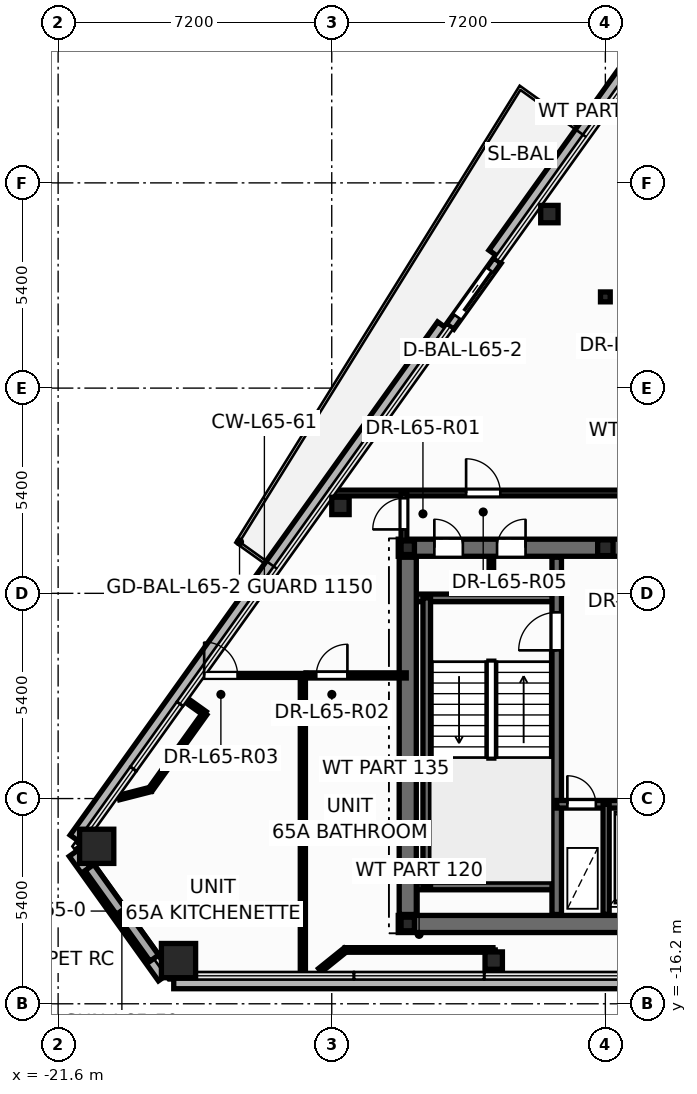
"""IFC4 building model, lengths in metres.
Left out: names, types, materials, properties, quantities, classifications, styles, units other than length and angle.
Written with IfcOpenShell. Run it as: python <this file> out.ifc"""

import sys

from ifc_helpers import new_model, si_unit, direction, frame, frame_2d, origin, origin_2d, place, context, subcontext, project, spatial, rectangle, hollow_rectangle, hollow_circle, i_section, extrude, element, fill, save


model = new_model("IFC4")
c1 = context("Model", 3, precision=1e-05, world=origin(), true_north=direction((0.0, 1.0)))
c2 = subcontext(c1, "Body", "Model", "MODEL_VIEW")
j1 = project(units=[si_unit("LENGTHUNIT", "METRE"), si_unit("PLANEANGLEUNIT", "RADIAN")], contexts=[c1])
p1 = place(None, origin())
s1 = spatial("IfcSite", under=j1, at=p1, CompositionType="ELEMENT")
p2 = place(p1, origin())
s2 = spatial("IfcBuilding", under=s1, at=p2, CompositionType="ELEMENT")
p3 = place(p2, frame((0.0, 0.0, 249.0)))
s3 = spatial("IfcBuildingStorey", under=s2, at=p3, CompositionType="ELEMENT", Elevation=249.0)
for number, where, z_axis, x_axis in (
    (1, (-20.585, -12.057, 0.0), (0.0, 0.0, 1.0), (1.0, 0.0, 0.0)),
    (2, (-18.432, -15.063, 0.0), (0.0, 0.0, 1.0), (1.0, 0.0, 0.0)),
):
    element("IfcColumn", number, at=place(p3, frame(where, z_axis=z_axis, x_axis=x_axis)), inside=s3, PredefinedType="COLUMN", context=c2, shape_type="SweptSolid", body=[
        extrude(hollow_rectangle(XDim=0.9, YDim=0.9, WallThickness=0.04, at=origin_2d()), origin(), (0.0, 0.0, 1.0), 3.6),
    ])
for number, where, z_axis, x_axis in (
    (3, (-10.138, -15.063, 0.0), (0.0, 0.0, 1.0), (1.0, 0.0, 0.0)),
    (4, (-8.673, 4.579, 0.0), (0.0, 0.0, 1.0), (1.0, 0.0, 0.0)),
    (5, (-14.171, -3.099, 0.0), (0.0, 0.0, 1.0), (1.0, 0.0, 0.0)),
):
    element("IfcColumn", number, at=place(p3, frame(where, z_axis=z_axis, x_axis=x_axis)), inside=s3, PredefinedType="COLUMN", context=c2, shape_type="SweptSolid", body=[
        extrude(hollow_circle(Radius=0.229, WallThickness=0.016, at=origin_2d()), origin(), (0.0, 0.0, 1.0), 3.6),
    ])
for number, where, z_axis, x_axis in (
    (6, (-12.4, -14.1, 0.0), (0.0, 0.0, 1.0), (1.0, 0.0, 0.0)),
    (7, (-12.4, -4.2, 0.0), (0.0, 0.0, 1.0), (1.0, 0.0, 0.0)),
):
    element("IfcColumn", number, at=place(p3, frame(where, z_axis=z_axis, x_axis=x_axis)), inside=s3, PredefinedType="COLUMN", context=c2, shape_type="SweptSolid", body=[
        extrude(i_section(OverallWidth=0.352, OverallDepth=0.359, WebThickness=0.018, FlangeThickness=0.026, at=origin_2d()), origin(), (0.0, 0.0, 1.0), 3.6),
    ])
p4 = place(p3, frame((-7.2, -4.2, 0.0), z_axis=(0.0, 0.0, 1.0), x_axis=(1.0, 0.0, 0.0)))
e8 = element("IfcColumn", 8, at=p4, inside=s3, PredefinedType="PILASTER", context=c2, shape_type="SweptSolid", body=[
    extrude(i_section(OverallWidth=0.405, OverallDepth=0.414, WebThickness=0.022, FlangeThickness=0.032, at=origin_2d()), origin(), (0.0, 0.0, 1.0), 3.6),
])
p5 = place(p3, frame((-7.2, 2.4, 0.0), z_axis=(0.0, 0.0, 1.0), x_axis=(1.0, 0.0, 0.0)))
e9 = element("IfcColumn", 9, at=p5, inside=s3, PredefinedType="COLUMN", context=c2, shape_type="SweptSolid", body=[
    extrude(i_section(OverallWidth=0.256, OverallDepth=0.26, WebThickness=0.01, FlangeThickness=0.017, at=origin_2d()), origin(), (0.0, 0.0, 1.0), 3.6),
])
p6 = place(p3, frame((-21.161, -12.215, -0.2), z_axis=(0.0, 0.0, 1.0), x_axis=(0.582223401732, -0.813028849719, 0.0)))
e10 = element("IfcWall", 10, at=p6, inside=s3, PredefinedType="PARAPET", context=c2, shape_type="SweptSolid", body=[
    extrude(rectangle(XDim=4.03, YDim=0.36, at=frame_2d((2.015, 0.0))), origin(), (0.0, 0.0, 1.0), 0.38),
])
p7 = place(p3, frame((-18.558, -15.623, -0.2), z_axis=(0.0, 0.0, 1.0), x_axis=(1.0, 0.0, 0.0)))
e11 = element("IfcWall", 11, at=p7, inside=s3, PredefinedType="PARAPET", context=c2, shape_type="SweptSolid", body=[
    extrude(rectangle(XDim=37.115, YDim=0.36, at=frame_2d((18.558, 0.0))), origin(), (0.0, 0.0, 1.0), 0.38),
])
p8 = place(p3, frame((-2.664, 13.932, -0.2), z_axis=(0.0, 0.0, 1.0), x_axis=(-0.582199295351, -0.813046112156, 0.0)))
e12 = element("IfcWall", 12, at=p8, inside=s3, PredefinedType="PARAPET", context=c2, shape_type="SweptSolid", body=[
    extrude(rectangle(XDim=12.802, YDim=0.36, at=frame_2d((6.401, 0.0))), origin(), (0.0, 0.0, 1.0), 0.38),
])
p9 = place(p3, frame((-11.468, 1.637, -0.2), z_axis=(0.0, 0.0, 1.0), x_axis=(-0.582200027891, -0.813045587605, 0.0)))
e13 = element("IfcWall", 13, at=p9, inside=s3, PredefinedType="PARAPET", context=c2, shape_type="SweptSolid", body=[
    extrude(rectangle(XDim=16.608, YDim=0.36, at=frame_2d((8.304, 0.0))), origin(), (0.0, 0.0, 1.0), 0.38),
])
p10 = place(p3, frame((-10.039, 3.357, -0.015), z_axis=(0.0, 0.0, 1.0), x_axis=(-0.58216589686, -0.813070026832, 0.0)))
e14 = element("IfcWall", 14, at=p10, inside=s3, PredefinedType="STANDARD", context=c2, shape_type="SweptSolid", body=[
    extrude(rectangle(XDim=2.14, YDim=0.24, at=frame_2d((1.07, 0.0))), origin(), (0.0, 0.0, 1.0), 2.878),
])
p11 = place(p10, frame((0.32, 0.0, 0.015)))
e15 = element("IfcOpeningElement", 15, at=p11, cuts=e14, PredefinedType="OPENING", context=c2, shape_type="SweptSolid", body=[
    extrude(rectangle(XDim=1.506, YDim=2.204, at=frame_2d((0.75, 1.102))), frame((0.0, 0.13, 0.0), z_axis=(0.0, -1.0, 0.0), x_axis=(1.0, 0.0, 0.0)), (0.0, 0.0, 1.0), 0.26),
])
p12 = place(p3, frame((-10.2, -5.52, 0.0), z_axis=(0.0, 0.0, 1.0), x_axis=(0.0, 1.0, 0.0)))
e16 = element("IfcWall", 16, at=p12, inside=s3, PredefinedType="PARTITIONING", context=c2, shape_type="SweptSolid", body=[
    extrude(rectangle(XDim=1.12, YDim=0.12, at=frame_2d((0.56, 0.0))), origin(), (0.0, 0.0, 1.0), 3.345),
])
p13 = place(p3, frame((-12.65, -14.1, 0.0), z_axis=(0.0, 0.0, 1.0), x_axis=(1.0, 0.0, 0.0)))
e17 = element("IfcWall", 17, at=p13, inside=s3, PredefinedType="SHEAR", context=c2, shape_type="SweptSolid", body=[
    extrude(rectangle(XDim=25.3, YDim=0.45, at=frame_2d((12.65, 0.0))), origin(), (0.0, 0.0, 1.0), 3.6),
])
p14 = place(p3, frame((-12.65, -4.2, 0.0), z_axis=(0.0, 0.0, 1.0), x_axis=(1.0, 0.0, 0.0)))
e18 = element("IfcWall", 18, at=p14, inside=s3, PredefinedType="SHEAR", context=c2, shape_type="SweptSolid", body=[
    extrude(rectangle(XDim=25.3, YDim=0.45, at=frame_2d((12.65, 0.0))), origin(), (0.0, 0.0, 1.0), 3.6),
])
p15 = place(p14, frame((0.95, 0.0, 0.0)))
e19 = element("IfcOpeningElement", 19, at=p15, cuts=e18, PredefinedType="OPENING", context=c2, shape_type="SweptSolid", body=[
    extrude(rectangle(XDim=0.756, YDim=2.054, at=frame_2d((0.375, 1.027))), frame((0.0, 0.235, 0.0), z_axis=(0.0, -1.0, 0.0), x_axis=(1.0, 0.0, 0.0)), (0.0, 0.0, 1.0), 0.47),
])
p16 = place(p14, frame((2.6, 0.0, 0.0)))
e20 = element("IfcOpeningElement", 20, at=p16, cuts=e18, PredefinedType="OPENING", context=c2, shape_type="SweptSolid", body=[
    extrude(rectangle(XDim=0.756, YDim=2.054, at=frame_2d((0.375, 1.027))), frame((0.0, 0.235, 0.0), z_axis=(0.0, -1.0, 0.0), x_axis=(1.0, 0.0, 0.0)), (0.0, 0.0, 1.0), 0.47),
])
p17 = place(p14, frame((21.85, 0.0, 0.0)))
e21 = element("IfcOpeningElement", 21, at=p17, cuts=e18, PredefinedType="OPENING", context=c2, shape_type="SweptSolid", body=[
    extrude(rectangle(XDim=0.756, YDim=2.054, at=frame_2d((0.375, 1.027))), frame((0.0, 0.235, 0.0), z_axis=(0.0, -1.0, 0.0), x_axis=(1.0, 0.0, 0.0)), (0.0, 0.0, 1.0), 0.47),
])
p18 = place(p14, frame((23.5, 0.0, 0.0)))
e22 = element("IfcOpeningElement", 22, at=p18, cuts=e18, PredefinedType="OPENING", context=c2, shape_type="SweptSolid", body=[
    extrude(rectangle(XDim=0.756, YDim=2.054, at=frame_2d((0.375, 1.027))), frame((0.0, 0.235, 0.0), z_axis=(0.0, -1.0, 0.0), x_axis=(1.0, 0.0, 0.0)), (0.0, 0.0, 1.0), 0.47),
])
p19 = place(p14, frame((5.85, 0.0, 0.0)))
e23 = element("IfcOpeningElement", 23, at=p19, cuts=e18, PredefinedType="OPENING", context=c2, shape_type="SweptSolid", body=[
    extrude(rectangle(XDim=1.006, YDim=2.104, at=frame_2d((0.5, 1.052))), frame((0.0, 0.235, 0.0), z_axis=(0.0, -1.0, 0.0), x_axis=(1.0, 0.0, 0.0)), (0.0, 0.0, 1.0), 0.47),
])
p20 = place(p14, frame((10.35, 0.0, 0.0)))
e24 = element("IfcOpeningElement", 24, at=p20, cuts=e18, PredefinedType="OPENING", context=c2, shape_type="SweptSolid", body=[
    extrude(rectangle(XDim=1.406, YDim=2.154, at=frame_2d((0.7, 1.077))), frame((0.0, 0.235, 0.0), z_axis=(0.0, -1.0, 0.0), x_axis=(1.0, 0.0, 0.0)), (0.0, 0.0, 1.0), 0.47),
])
p21 = place(p14, frame((18.45, 0.0, 0.0)))
e25 = element("IfcOpeningElement", 25, at=p21, cuts=e18, PredefinedType="OPENING", context=c2, shape_type="SweptSolid", body=[
    extrude(rectangle(XDim=1.006, YDim=2.104, at=frame_2d((0.5, 1.052))), frame((0.0, 0.235, 0.0), z_axis=(0.0, -1.0, 0.0), x_axis=(1.0, 0.0, 0.0)), (0.0, 0.0, 1.0), 0.47),
])
for number, where, z_axis, x_axis in (
    (26, (-12.35, -5.52, 0.0), (0.0, 0.0, 1.0), (1.0, 0.0, 0.0)),
    (27, (-12.35, -13.1, 0.0), (0.0, 0.0, 1.0), (1.0, 0.0, 0.0)),
):
    element("IfcWall", number, at=place(p3, frame(where, z_axis=z_axis, x_axis=x_axis)), inside=s3, PredefinedType="SOLIDWALL", context=c2, shape_type="SweptSolid", body=[
        extrude(rectangle(XDim=3.87, YDim=0.2, at=frame_2d((1.935, 0.0))), origin(), (0.0, 0.0, 1.0), 3.6),
    ])
p22 = place(p3, frame((-11.9, -13.1, 0.0), z_axis=(0.0, 0.0, 1.0), x_axis=(0.0, 1.0, 0.0)))
e28 = element("IfcWall", 28, at=p22, inside=s3, PredefinedType="SOLIDWALL", context=c2, shape_type="SweptSolid", body=[
    extrude(rectangle(XDim=7.58, YDim=0.2, at=frame_2d((3.79, 0.0))), origin(), (0.0, 0.0, 1.0), 3.6),
])
p23 = place(p3, frame((-8.48, -13.85, 0.0), z_axis=(0.0, 0.0, 1.0), x_axis=(0.0, 1.0, 0.0)))
e29 = element("IfcWall", 29, at=p23, inside=s3, PredefinedType="SHEAR", context=c2, shape_type="SweptSolid", body=[
    extrude(rectangle(XDim=9.4, YDim=0.25, at=frame_2d((4.7, 0.0))), origin(), (0.0, 0.0, 1.0), 3.6),
])
p24 = place(p23, frame((6.95, 0.0, 0.0)))
e30 = element("IfcOpeningElement", 30, at=p24, cuts=e29, PredefinedType="OPENING", context=c2, shape_type="SweptSolid", body=[
    extrude(rectangle(XDim=1.006, YDim=2.104, at=frame_2d((0.5, 1.052))), frame((0.0, 0.135, 0.0), z_axis=(0.0, -1.0, 0.0), x_axis=(1.0, 0.0, 0.0)), (0.0, 0.0, 1.0), 0.27),
])
p25 = place(p3, frame((-8.48, -10.95, 0.0), z_axis=(0.0, 0.0, 1.0), x_axis=(1.0, 0.0, 0.0)))
e31 = element("IfcWall", 31, at=p25, inside=s3, PredefinedType="SOLIDWALL", context=c2, shape_type="SweptSolid", body=[
    extrude(rectangle(XDim=3.36, YDim=0.2, at=frame_2d((1.68, 0.0))), origin(), (0.0, 0.0, 1.0), 3.6),
])
p26 = place(p25, frame((0.28, 0.0, 0.0)))
e32 = element("IfcOpeningElement", 32, at=p26, cuts=e31, PredefinedType="OPENING", context=c2, shape_type="SweptSolid", body=[
    extrude(rectangle(XDim=0.756, YDim=2.054, at=frame_2d((0.375, 1.027))), frame((0.0, 0.11, 0.0), z_axis=(0.0, -1.0, 0.0), x_axis=(1.0, 0.0, 0.0)), (0.0, 0.0, 1.0), 0.22),
])
p27 = place(p25, frame((1.85, 0.0, 0.0)))
e33 = element("IfcOpeningElement", 33, at=p27, cuts=e31, PredefinedType="OPENING", context=c2, shape_type="SweptSolid", body=[
    extrude(rectangle(XDim=1.106, YDim=2.104, at=frame_2d((0.55, 1.052))), frame((0.0, 0.11, 0.0), z_axis=(0.0, -1.0, 0.0), x_axis=(1.0, 0.0, 0.0)), (0.0, 0.0, 1.0), 0.22),
])
p28 = place(p3, frame((-7.18, -13.85, 0.0), z_axis=(0.0, 0.0, 1.0), x_axis=(0.0, 1.0, 0.0)))
e34 = element("IfcWall", 34, at=p28, inside=s3, PredefinedType="PARTITIONING", context=c2, shape_type="SweptSolid", body=[
    extrude(rectangle(XDim=2.9, YDim=0.16, at=frame_2d((1.45, 0.0))), origin(), (0.0, 0.0, 1.0), 2.57),
])
p29 = place(p3, frame((-12.4, -13.85, 0.0), z_axis=(0.0, 0.0, 1.0), x_axis=(0.0, 1.0, 0.0)))
e35 = element("IfcWall", 35, at=p29, inside=s3, PredefinedType="SHEAR", context=c2, shape_type="SweptSolid", body=[
    extrude(rectangle(XDim=9.4, YDim=0.45, at=frame_2d((4.7, 0.0))), origin(), (0.0, 0.0, 1.0), 3.6),
])
p30 = place(p3, frame((-14.42, -2.76, 0.0), z_axis=(0.0, 0.0, 1.0), x_axis=(1.0, 0.0, 0.0)))
e36 = element("IfcWall", 36, at=p30, inside=s3, PredefinedType="PARTITIONING", context=c2, shape_type="SweptSolid", body=[
    extrude(rectangle(XDim=9.88, YDim=0.15, at=frame_2d((4.94, 0.0))), origin(), (0.0, 0.0, 1.0), 2.32),
])
p31 = place(p30, frame((3.555, 0.0, 0.0)))
e37 = element("IfcOpeningElement", 37, at=p31, cuts=e36, PredefinedType="OPENING", context=c2, shape_type="SweptSolid", body=[
    extrude(rectangle(XDim=0.906, YDim=2.104, at=frame_2d((0.45, 1.052))), frame((0.0, 0.085, 0.0), z_axis=(0.0, -1.0, 0.0), x_axis=(1.0, 0.0, 0.0)), (0.0, 0.0, 1.0), 0.17),
])
p32 = place(p3, frame((-15.16, -15.463, 0.0), z_axis=(0.0, 0.0, 1.0), x_axis=(0.0, 1.0, 0.0)))
e38 = element("IfcWall", 38, at=p32, inside=s3, PredefinedType="PARTITIONING", context=c2, shape_type="SweptSolid", body=[
    extrude(rectangle(XDim=7.903, YDim=0.135, at=frame_2d((3.952, 0.0))), origin(), (0.0, 0.0, 1.0), 2.863),
])
p33 = place(p3, frame((-14.044, -14.783, 0.0), z_axis=(0.0, 0.0, 1.0), x_axis=(1.0, 0.0, 0.0)))
e39 = element("IfcWall", 39, at=p33, inside=s3, PredefinedType="PARTITIONING", context=c2, shape_type="SweptSolid", body=[
    extrude(rectangle(XDim=3.886, YDim=0.12, at=frame_2d((1.943, 0.0))), origin(), (0.0, 0.0, 1.0), 2.863),
])
p34 = place(p3, frame((-17.857, -7.56, 0.0), z_axis=(0.0, 0.0, 1.0), x_axis=(1.0, 0.0, 0.0)))
e40 = element("IfcWall", 40, at=p34, inside=s3, PredefinedType="PARTITIONING", context=c2, shape_type="SweptSolid", body=[
    extrude(rectangle(XDim=2.777, YDim=0.105, at=frame_2d((1.389, 0.0))), origin(), (0.0, 0.0, 1.0), 2.32),
])
p35 = place(p34, frame((0.1, 0.0, 0.0)))
e41 = element("IfcOpeningElement", 41, at=p35, cuts=e40, PredefinedType="OPENING", context=c2, shape_type="SweptSolid", body=[
    extrude(rectangle(XDim=0.886, YDim=2.104, at=frame_2d((0.44, 1.052))), frame((0.0, 0.062, 0.0), z_axis=(0.0, -1.0, 0.0), x_axis=(1.0, 0.0, 0.0)), (0.0, 0.0, 1.0), 0.125),
])
p36 = place(p3, frame((-15.078, -7.56, 0.0), z_axis=(0.0, 0.0, 1.0), x_axis=(1.0, 0.0, 0.0)))
e42 = element("IfcWall", 42, at=p36, inside=s3, PredefinedType="PARTITIONING", context=c2, shape_type="SweptSolid", body=[
    extrude(rectangle(XDim=2.638, YDim=0.135, at=frame_2d((1.319, 0.0))), origin(), (0.0, 0.0, 1.0), 2.863),
])
p37 = place(p36, frame((0.271, 0.0, 0.0)))
e43 = element("IfcOpeningElement", 43, at=p37, cuts=e42, PredefinedType="OPENING", context=c2, shape_type="SweptSolid", body=[
    extrude(rectangle(XDim=0.826, YDim=2.104, at=frame_2d((0.41, 1.052))), frame((0.0, 0.078, 0.0), z_axis=(0.0, -1.0, 0.0), x_axis=(1.0, 0.0, 0.0)), (0.0, 0.0, 1.0), 0.155),
])
p38 = place(p3, frame((-17.738, -8.561, 0.0), z_axis=(0.0, 0.0, 1.0), x_axis=(-0.582157358489, -0.81307614032, 0.0)))
e44 = element("IfcWall", 44, at=p38, inside=s3, PredefinedType="PARTITIONING", context=c2, shape_type="SweptSolid", body=[
    extrude(rectangle(XDim=2.461, YDim=0.12, at=frame_2d((1.23, 0.0))), origin(), (0.0, 0.0, 1.0), 2.32),
])
p39 = place(p3, frame((-12.5, -4.24, 0.0), z_axis=(0.0, 0.0, 1.0), x_axis=(0.0, 1.0, 0.0)))
e45 = element("IfcWall", 45, at=p39, inside=s3, PredefinedType="PARTITIONING", context=c2, shape_type="SweptSolid", body=[
    extrude(rectangle(XDim=1.48, YDim=0.15, at=frame_2d((0.74, 0.0))), origin(), (0.0, 0.0, 1.0), 2.32),
])
p40 = place(p39, frame((0.522, 0.0, 0.0)))
e46 = element("IfcOpeningElement", 46, at=p40, cuts=e45, PredefinedType="OPENING", context=c2, shape_type="SweptSolid", body=[
    extrude(rectangle(XDim=0.826, YDim=2.104, at=frame_2d((0.41, 1.052))), frame((0.0, 0.085, 0.0), z_axis=(0.0, -1.0, 0.0), x_axis=(1.0, 0.0, 0.0)), (0.0, 0.0, 1.0), 0.17),
])
p41 = place(p3, frame((-14.708, -15.318, 0.0), z_axis=(0.0, 0.0, 1.0), x_axis=(0.778769450364, 0.62731024476, 0.0)))
e47 = element("IfcWall", 47, at=p41, inside=s3, PredefinedType="PARTITIONING", context=c2, shape_type="SweptSolid", body=[
    extrude(rectangle(XDim=0.853, YDim=0.12, at=frame_2d((0.426, 0.0))), origin(), (0.0, 0.0, 1.0), 2.863),
])
p42 = place(p3, frame((-19.17, -10.562, 0.0), z_axis=(0.0, 0.0, 1.0), x_axis=(-0.968778693612, -0.247927091708, 0.0)))
e48 = element("IfcWall", 48, at=p42, inside=s3, PredefinedType="PARTITIONING", context=c2, shape_type="SweptSolid", body=[
    extrude(rectangle(XDim=0.852, YDim=0.12, at=frame_2d((0.426, 0.0))), origin(), (0.0, 0.0, 1.0), 2.32),
])
p43 = place(p3, frame((-18.282, -8.171, 0.0), z_axis=(0.0, 0.0, 1.0), x_axis=(0.813142011208, -0.582065348229, 0.0)))
e49 = element("IfcWall", 49, at=p43, inside=s3, PredefinedType="PARTITIONING", context=c2, shape_type="SweptSolid", body=[
    extrude(rectangle(XDim=0.67, YDim=0.12, at=frame_2d((0.335, 0.0))), origin(), (0.0, 0.0, 1.0), 2.863),
])
p44 = place(p3, frame((-10.158, -14.783, 0.0), z_axis=(0.0, 0.0, 1.0), x_axis=(0.0, -1.0, 0.0)))
e50 = element("IfcWall", 50, at=p44, inside=s3, PredefinedType="PARTITIONING", context=c2, shape_type="SweptSolid", body=[
    extrude(rectangle(XDim=0.67, YDim=0.12, at=frame_2d((0.335, 0.0))), origin(), (0.0, 0.0, 1.0), 2.863),
])
p45 = place(p11, origin())
e51 = element("IfcDoor", 51, at=p45, inside=s3, OperationType="SLIDING_TO_RIGHT", PredefinedType="DOOR", context=c2, shape_type="SweptSolid", body=[
    extrude(rectangle(XDim=1.5, YDim=2.2, at=frame_2d((0.75, 1.1))), frame((0.0, 0.025, 0.0), z_axis=(0.0, -1.0, 0.0), x_axis=(1.0, 0.0, 0.0)), (0.0, 0.0, 1.0), 0.05),
])
fill(e15, e51)
p46 = place(p24, origin())
e52 = element("IfcDoor", 52, at=p46, inside=s3, OperationType="SINGLE_SWING_LEFT", PredefinedType="DOOR", context=c2, shape_type="SweptSolid", body=[
    extrude(rectangle(XDim=1.0, YDim=2.1, at=frame_2d((0.5, 1.05))), frame((0.0, 0.025, 0.0), z_axis=(0.0, -1.0, 0.0), x_axis=(1.0, 0.0, 0.0)), (0.0, 0.0, 1.0), 0.05),
])
fill(e30, e52)
p47 = place(p26, origin())
e53 = element("IfcDoor", 53, at=p47, inside=s3, OperationType="SINGLE_SWING_LEFT", PredefinedType="DOOR", context=c2, shape_type="SweptSolid", body=[
    extrude(rectangle(XDim=0.75, YDim=2.05, at=frame_2d((0.375, 1.025))), frame((0.0, 0.025, 0.0), z_axis=(0.0, -1.0, 0.0), x_axis=(1.0, 0.0, 0.0)), (0.0, 0.0, 1.0), 0.05),
])
fill(e32, e53)
p48 = place(p15, origin())
e54 = element("IfcDoor", 54, at=p48, inside=s3, OperationType="SINGLE_SWING_LEFT", PredefinedType="DOOR", context=c2, shape_type="SweptSolid", body=[
    extrude(rectangle(XDim=0.75, YDim=2.05, at=frame_2d((0.375, 1.025))), frame((0.0, 0.025, 0.0), z_axis=(0.0, -1.0, 0.0), x_axis=(1.0, 0.0, 0.0)), (0.0, 0.0, 1.0), 0.05),
])
fill(e19, e54)
p49 = place(p16, origin())
e55 = element("IfcDoor", 55, at=p49, inside=s3, OperationType="SINGLE_SWING_RIGHT", PredefinedType="DOOR", context=c2, shape_type="SweptSolid", body=[
    extrude(rectangle(XDim=0.75, YDim=2.05, at=frame_2d((0.375, 1.025))), frame((0.0, 0.025, 0.0), z_axis=(0.0, -1.0, 0.0), x_axis=(1.0, 0.0, 0.0)), (0.0, 0.0, 1.0), 0.05),
])
fill(e20, e55)
p50 = place(p40, origin())
e56 = element("IfcDoor", 56, at=p50, inside=s3, OperationType="SINGLE_SWING_LEFT", PredefinedType="DOOR", context=c2, shape_type="SweptSolid", body=[
    extrude(rectangle(XDim=0.82, YDim=2.1, at=frame_2d((0.41, 1.05))), frame((0.0, 0.025, 0.0), z_axis=(0.0, -1.0, 0.0), x_axis=(1.0, 0.0, 0.0)), (0.0, 0.0, 1.0), 0.05),
])
fill(e46, e56)
p51 = place(p37, origin())
e57 = element("IfcDoor", 57, at=p51, inside=s3, OperationType="SINGLE_SWING_RIGHT", PredefinedType="DOOR", context=c2, shape_type="SweptSolid", body=[
    extrude(rectangle(XDim=0.82, YDim=2.1, at=frame_2d((0.41, 1.05))), frame((0.0, 0.025, 0.0), z_axis=(0.0, -1.0, 0.0), x_axis=(1.0, 0.0, 0.0)), (0.0, 0.0, 1.0), 0.05),
])
fill(e43, e57)
p52 = place(p35, origin())
e58 = element("IfcDoor", 58, at=p52, inside=s3, OperationType="SINGLE_SWING_LEFT", PredefinedType="DOOR", context=c2, shape_type="SweptSolid", body=[
    extrude(rectangle(XDim=0.88, YDim=2.1, at=frame_2d((0.44, 1.05))), frame((0.0, 0.025, 0.0), z_axis=(0.0, -1.0, 0.0), x_axis=(1.0, 0.0, 0.0)), (0.0, 0.0, 1.0), 0.05),
])
fill(e41, e58)
p53 = place(p31, origin())
e59 = element("IfcDoor", 59, at=p53, inside=s3, OperationType="SINGLE_SWING_LEFT", PredefinedType="DOOR", context=c2, shape_type="SweptSolid", body=[
    extrude(rectangle(XDim=0.9, YDim=2.1, at=frame_2d((0.45, 1.05))), frame((0.0, 0.025, 0.0), z_axis=(0.0, -1.0, 0.0), x_axis=(1.0, 0.0, 0.0)), (0.0, 0.0, 1.0), 0.05),
])
fill(e37, e59)
save(model, sys.argv[1])
